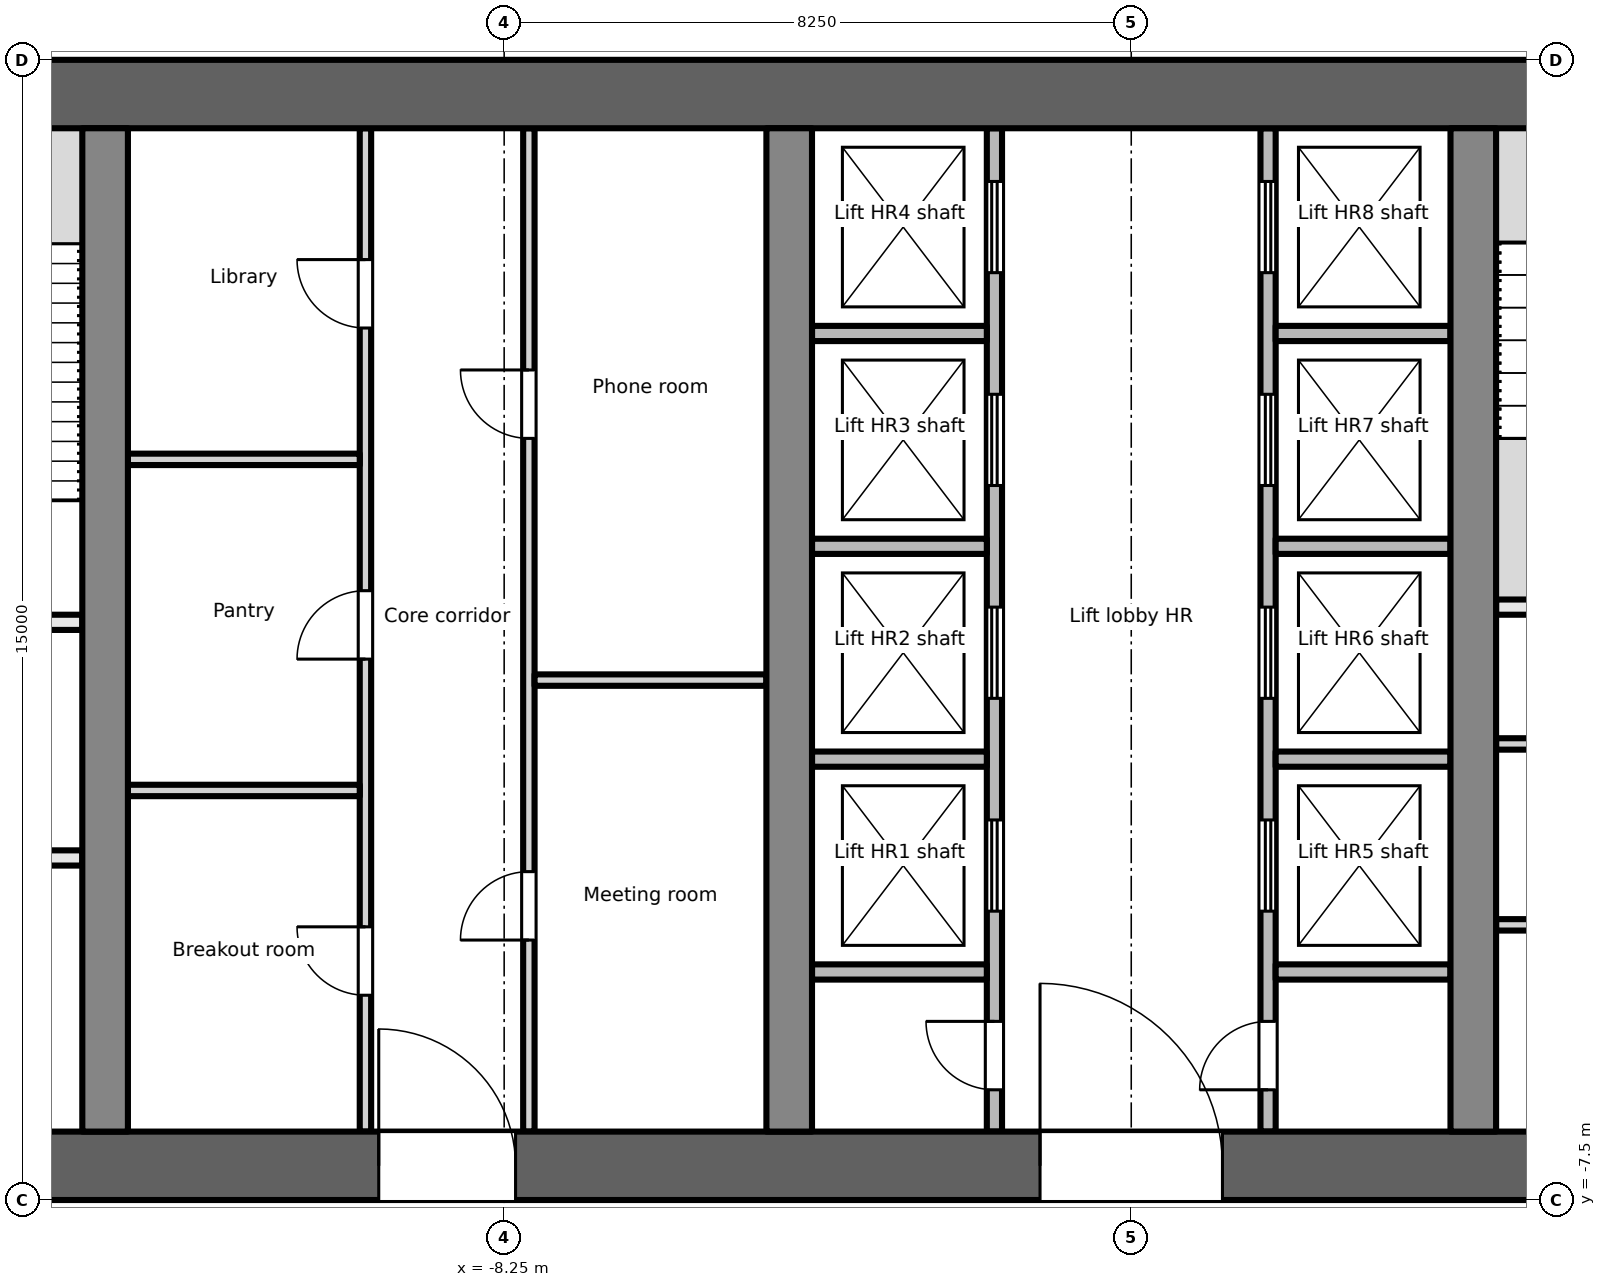
"""IFC4 building model, lengths in metres.
Left out: names, types, materials, properties, quantities, classifications, styles, units other than length and angle.
Written with IfcOpenShell. Run it as: python <this file> out.ifc"""

import sys

from ifc_helpers import new_model, si_unit, direction, frame, frame_2d, origin, place, context, subcontext, project, spatial, rectangle, extrude, element, fill, save


model = new_model("IFC4")
c1 = context("Model", 3, precision=1e-05, world=origin(), true_north=direction((0.0, 1.0)))
c2 = subcontext(c1, "Body", "Model", "MODEL_VIEW")
j1 = project(units=[si_unit("LENGTHUNIT", "METRE"), si_unit("PLANEANGLEUNIT", "RADIAN")], contexts=[c1])
p1 = place(None, origin())
s1 = spatial("IfcSite", under=j1, at=p1, CompositionType="ELEMENT")
p2 = place(p1, origin())
s2 = spatial("IfcBuilding", under=s1, at=p2, CompositionType="ELEMENT")
p3 = place(p2, frame((0.0, 0.0, 244.7)))
s3 = spatial("IfcBuildingStorey", under=s2, at=p3, CompositionType="ELEMENT", Elevation=244.7)
p4 = place(p3, frame((-18.0, -7.05, -0.2), z_axis=(0.0, 0.0, 1.0), x_axis=(1.0, 0.0, 0.0)))
e1 = element("IfcWall", 1, at=p4, inside=s3, PredefinedType="SHEAR", context=c2, shape_type="SweptSolid", body=[
    extrude(rectangle(XDim=36.0, YDim=0.9, at=frame_2d((18.0, 0.0))), origin(), (0.0, 0.0, 1.0), 5.0),
])
p5 = place(p4, frame((8.1, 0.0, 0.2)))
e2 = element("IfcOpeningElement", 2, at=p5, cuts=e1, PredefinedType="OPENING", context=c2, shape_type="SweptSolid", body=[
    extrude(rectangle(XDim=1.8, YDim=2.1, at=frame_2d((0.9, 1.05))), frame((0.0, 0.46, 0.0), z_axis=(0.0, -1.0, 0.0), x_axis=(1.0, 0.0, 0.0)), (0.0, 0.0, 1.0), 0.921),
])
p6 = place(p4, frame((16.8, 0.0, 0.2)))
e3 = element("IfcOpeningElement", 3, at=p6, cuts=e1, PredefinedType="OPENING", context=c2, shape_type="SweptSolid", body=[
    extrude(rectangle(XDim=2.4, YDim=2.1, at=frame_2d((1.2, 1.05))), frame((0.0, 0.46, 0.0), z_axis=(0.0, -1.0, 0.0), x_axis=(1.0, 0.0, 0.0)), (0.0, 0.0, 1.0), 0.921),
])
p7 = place(p4, frame((26.1, 0.0, 0.2)))
e4 = element("IfcOpeningElement", 4, at=p7, cuts=e1, PredefinedType="OPENING", context=c2, shape_type="SweptSolid", body=[
    extrude(rectangle(XDim=2.4, YDim=2.1, at=frame_2d((1.2, 1.05))), frame((0.0, 0.46, 0.0), z_axis=(0.0, -1.0, 0.0), x_axis=(1.0, 0.0, 0.0)), (0.0, 0.0, 1.0), 0.921),
])
p8 = place(p3, frame((-18.0, 7.05, -0.2), z_axis=(0.0, 0.0, 1.0), x_axis=(1.0, 0.0, 0.0)))
e5 = element("IfcWall", 5, at=p8, inside=s3, PredefinedType="SHEAR", context=c2, shape_type="SweptSolid", body=[
    extrude(rectangle(XDim=36.0, YDim=0.9, at=frame_2d((18.0, 0.0))), origin(), (0.0, 0.0, 1.0), 5.0),
])
for number, where, z_axis, x_axis in (
    (6, (-13.5, -6.6, -0.2), (0.0, 0.0, 1.0), (0.0, 1.0, 0.0)),
    (7, (-4.5, -6.6, -0.2), (0.0, 0.0, 1.0), (0.0, 1.0, 0.0)),
    (8, (4.5, -6.6, -0.2), (0.0, 0.0, 1.0), (0.0, 1.0, 0.0)),
):
    element("IfcWall", number, at=place(p3, frame(where, z_axis=z_axis, x_axis=x_axis)), inside=s3, PredefinedType="SHEAR", context=c2, shape_type="SweptSolid", body=[
        extrude(rectangle(XDim=13.2, YDim=0.6, at=frame_2d((6.6, 0.0))), origin(), (0.0, 0.0, 1.0), 5.0),
    ])
p9 = place(p3, frame((-17.1, -3.0, 0.0), z_axis=(0.0, 0.0, 1.0), x_axis=(1.0, 0.0, 0.0)))
e9 = element("IfcWall", 9, at=p9, inside=s3, PredefinedType="PARTITIONING", context=c2, shape_type="SweptSolid", body=[
    extrude(rectangle(XDim=3.3, YDim=0.2, at=frame_2d((1.65, 0.0))), origin(), (0.0, 0.0, 1.0), 4.8),
])
p10 = place(p9, frame((1.1, 0.0, 0.0)))
e10 = element("IfcOpeningElement", 10, at=p10, cuts=e9, PredefinedType="OPENING", context=c2, shape_type="SweptSolid", body=[
    extrude(rectangle(XDim=1.1, YDim=2.1, at=frame_2d((0.55, 1.05))), frame((0.0, 0.111, 0.0), z_axis=(0.0, -1.0, 0.0), x_axis=(1.0, 0.0, 0.0)), (0.0, 0.0, 1.0), 0.221),
])
p11 = place(p3, frame((-17.1, 0.1, 0.0), z_axis=(0.0, 0.0, 1.0), x_axis=(1.0, 0.0, 0.0)))
e11 = element("IfcWall", 11, at=p11, inside=s3, PredefinedType="PARTITIONING", context=c2, shape_type="SweptSolid", body=[
    extrude(rectangle(XDim=3.3, YDim=0.2, at=frame_2d((1.65, 0.0))), origin(), (0.0, 0.0, 1.0), 4.8),
])
p12 = place(p11, frame((1.1, 0.0, 0.0)))
e12 = element("IfcOpeningElement", 12, at=p12, cuts=e11, PredefinedType="OPENING", context=c2, shape_type="SweptSolid", body=[
    extrude(rectangle(XDim=1.1, YDim=2.1, at=frame_2d((0.55, 1.05))), frame((0.0, 0.111, 0.0), z_axis=(0.0, -1.0, 0.0), x_axis=(1.0, 0.0, 0.0)), (0.0, 0.0, 1.0), 0.221),
])
p13 = place(p3, frame((-10.075, -6.6, 0.0), z_axis=(0.0, 0.0, 1.0), x_axis=(0.0, 1.0, 0.0)))
e13 = element("IfcWall", 13, at=p13, inside=s3, PredefinedType="PARTITIONING", context=c2, shape_type="SweptSolid", body=[
    extrude(rectangle(XDim=13.2, YDim=0.15, at=frame_2d((6.6, 0.0))), origin(), (0.0, 0.0, 1.0), 4.8),
])
p14 = place(p13, frame((1.794, 0.0, 0.0)))
e14 = element("IfcOpeningElement", 14, at=p14, cuts=e13, PredefinedType="OPENING", context=c2, shape_type="SweptSolid", body=[
    extrude(rectangle(XDim=0.9, YDim=2.1, at=frame_2d((0.45, 1.05))), frame((0.0, 0.085, 0.0), z_axis=(0.0, -1.0, 0.0), x_axis=(1.0, 0.0, 0.0)), (0.0, 0.0, 1.0), 0.171),
])
p15 = place(p13, frame((6.216, 0.0, 0.0)))
e15 = element("IfcOpeningElement", 15, at=p15, cuts=e13, PredefinedType="OPENING", context=c2, shape_type="SweptSolid", body=[
    extrude(rectangle(XDim=0.9, YDim=2.1, at=frame_2d((0.45, 1.05))), frame((0.0, 0.085, 0.0), z_axis=(0.0, -1.0, 0.0), x_axis=(1.0, 0.0, 0.0)), (0.0, 0.0, 1.0), 0.171),
])
p16 = place(p13, frame((10.572, 0.0, 0.0)))
e16 = element("IfcOpeningElement", 16, at=p16, cuts=e13, PredefinedType="OPENING", context=c2, shape_type="SweptSolid", body=[
    extrude(rectangle(XDim=0.9, YDim=2.1, at=frame_2d((0.45, 1.05))), frame((0.0, 0.085, 0.0), z_axis=(0.0, -1.0, 0.0), x_axis=(1.0, 0.0, 0.0)), (0.0, 0.0, 1.0), 0.171),
])
for number, where, z_axis, x_axis in (
    (17, (-13.2, -2.112, 0.0), (0.0, 0.0, 1.0), (1.0, 0.0, 0.0)),
    (18, (-13.2, 2.244, 0.0), (0.0, 0.0, 1.0), (1.0, 0.0, 0.0)),
):
    element("IfcWall", number, at=place(p3, frame(where, z_axis=z_axis, x_axis=x_axis)), inside=s3, PredefinedType="PARTITIONING", context=c2, shape_type="SweptSolid", body=[
        extrude(rectangle(XDim=3.05, YDim=0.15, at=frame_2d((1.525, 0.0))), origin(), (0.0, 0.0, 1.0), 4.8),
    ])
p17 = place(p3, frame((-7.925, -6.6, 0.0), z_axis=(0.0, 0.0, 1.0), x_axis=(0.0, 1.0, 0.0)))
e19 = element("IfcWall", 19, at=p17, inside=s3, PredefinedType="PARTITIONING", context=c2, shape_type="SweptSolid", body=[
    extrude(rectangle(XDim=13.2, YDim=0.15, at=frame_2d((6.6, 0.0))), origin(), (0.0, 0.0, 1.0), 4.8),
])
p18 = place(p17, frame((2.52, 0.0, 0.0)))
e20 = element("IfcOpeningElement", 20, at=p18, cuts=e19, PredefinedType="OPENING", context=c2, shape_type="SweptSolid", body=[
    extrude(rectangle(XDim=0.9, YDim=2.1, at=frame_2d((0.45, 1.05))), frame((0.0, 0.085, 0.0), z_axis=(0.0, -1.0, 0.0), x_axis=(1.0, 0.0, 0.0)), (0.0, 0.0, 1.0), 0.171),
])
p19 = place(p17, frame((9.12, 0.0, 0.0)))
e21 = element("IfcOpeningElement", 21, at=p19, cuts=e19, PredefinedType="OPENING", context=c2, shape_type="SweptSolid", body=[
    extrude(rectangle(XDim=0.9, YDim=2.1, at=frame_2d((0.45, 1.05))), frame((0.0, 0.085, 0.0), z_axis=(0.0, -1.0, 0.0), x_axis=(1.0, 0.0, 0.0)), (0.0, 0.0, 1.0), 0.171),
])
p20 = place(p3, frame((-7.85, -0.66, 0.0), z_axis=(0.0, 0.0, 1.0), x_axis=(1.0, 0.0, 0.0)))
e22 = element("IfcWall", 22, at=p20, inside=s3, PredefinedType="PARTITIONING", context=c2, shape_type="SweptSolid", body=[
    extrude(rectangle(XDim=3.05, YDim=0.15, at=frame_2d((1.525, 0.0))), origin(), (0.0, 0.0, 1.0), 4.8),
])
p21 = place(p3, frame((-1.8, -6.6, 0.0), z_axis=(0.0, 0.0, 1.0), x_axis=(0.0, 1.0, 0.0)))
e23 = element("IfcWall", 23, at=p21, inside=s3, PredefinedType="PARTITIONING", context=c2, shape_type="SweptSolid", body=[
    extrude(rectangle(XDim=13.2, YDim=0.2, at=frame_2d((6.6, 0.0))), origin(), (0.0, 0.0, 1.0), 4.8),
])
p22 = place(p21, frame((0.55, 0.0, 0.0)))
e24 = element("IfcOpeningElement", 24, at=p22, cuts=e23, PredefinedType="OPENING", context=c2, shape_type="SweptSolid", body=[
    extrude(rectangle(XDim=0.9, YDim=2.1, at=frame_2d((0.45, 1.05))), frame((0.0, 0.111, 0.0), z_axis=(0.0, -1.0, 0.0), x_axis=(1.0, 0.0, 0.0)), (0.0, 0.0, 1.0), 0.221),
])
p23 = place(p21, frame((2.9, 0.0, 0.0)))
e25 = element("IfcOpeningElement", 25, at=p23, cuts=e23, PredefinedType="OPENING", context=c2, shape_type="SweptSolid", body=[
    extrude(rectangle(XDim=1.2, YDim=2.1, at=frame_2d((0.6, 1.05))), frame((0.0, 0.111, 0.0), z_axis=(0.0, -1.0, 0.0), x_axis=(1.0, 0.0, 0.0)), (0.0, 0.0, 1.0), 0.221),
])
p24 = place(p21, frame((5.7, 0.0, 0.0)))
e26 = element("IfcOpeningElement", 26, at=p24, cuts=e23, PredefinedType="OPENING", context=c2, shape_type="SweptSolid", body=[
    extrude(rectangle(XDim=1.2, YDim=2.1, at=frame_2d((0.6, 1.05))), frame((0.0, 0.111, 0.0), z_axis=(0.0, -1.0, 0.0), x_axis=(1.0, 0.0, 0.0)), (0.0, 0.0, 1.0), 0.221),
])
p25 = place(p21, frame((8.5, 0.0, 0.0)))
e27 = element("IfcOpeningElement", 27, at=p25, cuts=e23, PredefinedType="OPENING", context=c2, shape_type="SweptSolid", body=[
    extrude(rectangle(XDim=1.2, YDim=2.1, at=frame_2d((0.6, 1.05))), frame((0.0, 0.111, 0.0), z_axis=(0.0, -1.0, 0.0), x_axis=(1.0, 0.0, 0.0)), (0.0, 0.0, 1.0), 0.221),
])
p26 = place(p21, frame((11.3, 0.0, 0.0)))
e28 = element("IfcOpeningElement", 28, at=p26, cuts=e23, PredefinedType="OPENING", context=c2, shape_type="SweptSolid", body=[
    extrude(rectangle(XDim=1.2, YDim=2.1, at=frame_2d((0.6, 1.05))), frame((0.0, 0.111, 0.0), z_axis=(0.0, -1.0, 0.0), x_axis=(1.0, 0.0, 0.0)), (0.0, 0.0, 1.0), 0.221),
])
p27 = place(p3, frame((1.8, -6.6, 0.0), z_axis=(0.0, 0.0, 1.0), x_axis=(0.0, 1.0, 0.0)))
e29 = element("IfcWall", 29, at=p27, inside=s3, PredefinedType="PARTITIONING", context=c2, shape_type="SweptSolid", body=[
    extrude(rectangle(XDim=13.2, YDim=0.2, at=frame_2d((6.6, 0.0))), origin(), (0.0, 0.0, 1.0), 4.8),
])
p28 = place(p27, frame((0.55, 0.0, 0.0)))
e30 = element("IfcOpeningElement", 30, at=p28, cuts=e29, PredefinedType="OPENING", context=c2, shape_type="SweptSolid", body=[
    extrude(rectangle(XDim=0.9, YDim=2.1, at=frame_2d((0.45, 1.05))), frame((0.0, 0.111, 0.0), z_axis=(0.0, -1.0, 0.0), x_axis=(1.0, 0.0, 0.0)), (0.0, 0.0, 1.0), 0.221),
])
p29 = place(p27, frame((2.9, 0.0, 0.0)))
e31 = element("IfcOpeningElement", 31, at=p29, cuts=e29, PredefinedType="OPENING", context=c2, shape_type="SweptSolid", body=[
    extrude(rectangle(XDim=1.2, YDim=2.1, at=frame_2d((0.6, 1.05))), frame((0.0, 0.111, 0.0), z_axis=(0.0, -1.0, 0.0), x_axis=(1.0, 0.0, 0.0)), (0.0, 0.0, 1.0), 0.221),
])
p30 = place(p27, frame((5.7, 0.0, 0.0)))
e32 = element("IfcOpeningElement", 32, at=p30, cuts=e29, PredefinedType="OPENING", context=c2, shape_type="SweptSolid", body=[
    extrude(rectangle(XDim=1.2, YDim=2.1, at=frame_2d((0.6, 1.05))), frame((0.0, 0.111, 0.0), z_axis=(0.0, -1.0, 0.0), x_axis=(1.0, 0.0, 0.0)), (0.0, 0.0, 1.0), 0.221),
])
p31 = place(p27, frame((8.5, 0.0, 0.0)))
e33 = element("IfcOpeningElement", 33, at=p31, cuts=e29, PredefinedType="OPENING", context=c2, shape_type="SweptSolid", body=[
    extrude(rectangle(XDim=1.2, YDim=2.1, at=frame_2d((0.6, 1.05))), frame((0.0, 0.111, 0.0), z_axis=(0.0, -1.0, 0.0), x_axis=(1.0, 0.0, 0.0)), (0.0, 0.0, 1.0), 0.221),
])
p32 = place(p27, frame((11.3, 0.0, 0.0)))
e34 = element("IfcOpeningElement", 34, at=p32, cuts=e29, PredefinedType="OPENING", context=c2, shape_type="SweptSolid", body=[
    extrude(rectangle(XDim=1.2, YDim=2.1, at=frame_2d((0.6, 1.05))), frame((0.0, 0.111, 0.0), z_axis=(0.0, -1.0, 0.0), x_axis=(1.0, 0.0, 0.0)), (0.0, 0.0, 1.0), 0.221),
])
for number, where, z_axis, x_axis in (
    (35, (-4.2, -1.7, 0.0), (0.0, 0.0, 1.0), (1.0, 0.0, 0.0)),
    (36, (-4.2, 1.1, 0.0), (0.0, 0.0, 1.0), (1.0, 0.0, 0.0)),
    (37, (-4.2, 3.9, 0.0), (0.0, 0.0, 1.0), (1.0, 0.0, 0.0)),
    (38, (-4.2, -4.5, 0.0), (0.0, 0.0, 1.0), (1.0, 0.0, 0.0)),
    (39, (1.9, -1.7, 0.0), (0.0, 0.0, 1.0), (1.0, 0.0, 0.0)),
    (40, (1.9, 1.1, 0.0), (0.0, 0.0, 1.0), (1.0, 0.0, 0.0)),
    (41, (1.9, 3.9, 0.0), (0.0, 0.0, 1.0), (1.0, 0.0, 0.0)),
    (42, (1.9, -4.5, 0.0), (0.0, 0.0, 1.0), (1.0, 0.0, 0.0)),
):
    element("IfcWall", number, at=place(p3, frame(where, z_axis=z_axis, x_axis=x_axis)), inside=s3, PredefinedType="PARTITIONING", context=c2, shape_type="SweptSolid", body=[
        extrude(rectangle(XDim=2.3, YDim=0.2, at=frame_2d((1.15, 0.0))), origin(), (0.0, 0.0, 1.0), 4.8),
    ])
p33 = place(p3, frame((4.8, 0.3, 0.0), z_axis=(0.0, 0.0, 1.0), x_axis=(1.0, 0.0, 0.0)))
e43 = element("IfcWall", 43, at=p33, inside=s3, PredefinedType="PARTITIONING", context=c2, shape_type="SweptSolid", body=[
    extrude(rectangle(XDim=3.15, YDim=0.2, at=frame_2d((1.575, 0.0))), origin(), (0.0, 0.0, 1.0), 4.8),
])
for number, where, z_axis, x_axis in (
    (44, (4.8, -3.88, 0.0), (0.0, 0.0, 1.0), (1.0, 0.0, 0.0)),
    (45, (4.8, -1.5, 0.0), (0.0, 0.0, 1.0), (1.0, 0.0, 0.0)),
):
    element("IfcWall", number, at=place(p3, frame(where, z_axis=z_axis, x_axis=x_axis)), inside=s3, PredefinedType="PARTITIONING", context=c2, shape_type="SweptSolid", body=[
        extrude(rectangle(XDim=3.15, YDim=0.15, at=frame_2d((1.575, 0.0))), origin(), (0.0, 0.0, 1.0), 4.8),
    ])
p34 = place(p14, origin())
e46 = element("IfcDoor", 46, at=p34, inside=s3, OperationType="SINGLE_SWING_RIGHT", PredefinedType="DOOR", context=c2, shape_type="SweptSolid", body=[
    extrude(rectangle(XDim=0.9, YDim=2.1, at=frame_2d((0.45, 1.05))), frame((0.0, 0.025, 0.0), z_axis=(0.0, -1.0, 0.0), x_axis=(1.0, 0.0, 0.0)), (0.0, 0.0, 1.0), 0.05),
])
fill(e14, e46)
p35 = place(p15, origin())
e47 = element("IfcDoor", 47, at=p35, inside=s3, OperationType="SINGLE_SWING_LEFT", PredefinedType="DOOR", context=c2, shape_type="SweptSolid", body=[
    extrude(rectangle(XDim=0.9, YDim=2.1, at=frame_2d((0.45, 1.05))), frame((0.0, 0.025, 0.0), z_axis=(0.0, -1.0, 0.0), x_axis=(1.0, 0.0, 0.0)), (0.0, 0.0, 1.0), 0.05),
])
fill(e15, e47)
p36 = place(p16, origin())
e48 = element("IfcDoor", 48, at=p36, inside=s3, OperationType="SINGLE_SWING_RIGHT", PredefinedType="DOOR", context=c2, shape_type="SweptSolid", body=[
    extrude(rectangle(XDim=0.9, YDim=2.1, at=frame_2d((0.45, 1.05))), frame((0.0, 0.025, 0.0), z_axis=(0.0, -1.0, 0.0), x_axis=(1.0, 0.0, 0.0)), (0.0, 0.0, 1.0), 0.05),
])
fill(e16, e48)
p37 = place(p18, origin())
e49 = element("IfcDoor", 49, at=p37, inside=s3, OperationType="SINGLE_SWING_LEFT", PredefinedType="DOOR", context=c2, shape_type="SweptSolid", body=[
    extrude(rectangle(XDim=0.9, YDim=2.1, at=frame_2d((0.45, 1.05))), frame((0.0, 0.025, 0.0), z_axis=(0.0, -1.0, 0.0), x_axis=(1.0, 0.0, 0.0)), (0.0, 0.0, 1.0), 0.05),
])
fill(e20, e49)
p38 = place(p19, origin())
e50 = element("IfcDoor", 50, at=p38, inside=s3, OperationType="SINGLE_SWING_RIGHT", PredefinedType="DOOR", context=c2, shape_type="SweptSolid", body=[
    extrude(rectangle(XDim=0.9, YDim=2.1, at=frame_2d((0.45, 1.05))), frame((0.0, 0.025, 0.0), z_axis=(0.0, -1.0, 0.0), x_axis=(1.0, 0.0, 0.0)), (0.0, 0.0, 1.0), 0.05),
])
fill(e21, e50)
p39 = place(p5, origin())
e51 = element("IfcDoor", 51, at=p39, inside=s3, OperationType="SINGLE_SWING_LEFT", PredefinedType="DOOR", context=c2, shape_type="SweptSolid", body=[
    extrude(rectangle(XDim=1.8, YDim=2.1, at=frame_2d((0.9, 1.05))), frame((0.0, 0.025, 0.0), z_axis=(0.0, -1.0, 0.0), x_axis=(1.0, 0.0, 0.0)), (0.0, 0.0, 1.0), 0.05),
])
fill(e2, e51)
p40 = place(p22, origin())
e52 = element("IfcDoor", 52, at=p40, inside=s3, OperationType="SINGLE_SWING_RIGHT", PredefinedType="DOOR", context=c2, shape_type="SweptSolid", body=[
    extrude(rectangle(XDim=0.9, YDim=2.1, at=frame_2d((0.45, 1.05))), frame((0.0, 0.025, 0.0), z_axis=(0.0, -1.0, 0.0), x_axis=(1.0, 0.0, 0.0)), (0.0, 0.0, 1.0), 0.05),
])
fill(e24, e52)
p41 = place(p23, origin())
e53 = element("IfcDoor", 53, at=p41, inside=s3, OperationType="DOUBLE_DOOR_SLIDING", PredefinedType="DOOR", context=c2, shape_type="SweptSolid", body=[
    extrude(rectangle(XDim=1.2, YDim=2.1, at=frame_2d((0.6, 1.05))), frame((0.0, 0.025, 0.0), z_axis=(0.0, -1.0, 0.0), x_axis=(1.0, 0.0, 0.0)), (0.0, 0.0, 1.0), 0.05),
])
fill(e25, e53)
p42 = place(p24, origin())
e54 = element("IfcDoor", 54, at=p42, inside=s3, OperationType="DOUBLE_DOOR_SLIDING", PredefinedType="DOOR", context=c2, shape_type="SweptSolid", body=[
    extrude(rectangle(XDim=1.2, YDim=2.1, at=frame_2d((0.6, 1.05))), frame((0.0, 0.025, 0.0), z_axis=(0.0, -1.0, 0.0), x_axis=(1.0, 0.0, 0.0)), (0.0, 0.0, 1.0), 0.05),
])
fill(e26, e54)
p43 = place(p25, origin())
e55 = element("IfcDoor", 55, at=p43, inside=s3, OperationType="DOUBLE_DOOR_SLIDING", PredefinedType="DOOR", context=c2, shape_type="SweptSolid", body=[
    extrude(rectangle(XDim=1.2, YDim=2.1, at=frame_2d((0.6, 1.05))), frame((0.0, 0.025, 0.0), z_axis=(0.0, -1.0, 0.0), x_axis=(1.0, 0.0, 0.0)), (0.0, 0.0, 1.0), 0.05),
])
fill(e27, e55)
p44 = place(p26, origin())
e56 = element("IfcDoor", 56, at=p44, inside=s3, OperationType="DOUBLE_DOOR_SLIDING", PredefinedType="DOOR", context=c2, shape_type="SweptSolid", body=[
    extrude(rectangle(XDim=1.2, YDim=2.1, at=frame_2d((0.6, 1.05))), frame((0.0, 0.025, 0.0), z_axis=(0.0, -1.0, 0.0), x_axis=(1.0, 0.0, 0.0)), (0.0, 0.0, 1.0), 0.05),
])
fill(e28, e56)
p45 = place(p28, origin())
e57 = element("IfcDoor", 57, at=p45, inside=s3, OperationType="SINGLE_SWING_LEFT", PredefinedType="DOOR", context=c2, shape_type="SweptSolid", body=[
    extrude(rectangle(XDim=0.9, YDim=2.1, at=frame_2d((0.45, 1.05))), frame((0.0, 0.025, 0.0), z_axis=(0.0, -1.0, 0.0), x_axis=(1.0, 0.0, 0.0)), (0.0, 0.0, 1.0), 0.05),
])
fill(e30, e57)
p46 = place(p29, origin())
e58 = element("IfcDoor", 58, at=p46, inside=s3, OperationType="DOUBLE_DOOR_SLIDING", PredefinedType="DOOR", context=c2, shape_type="SweptSolid", body=[
    extrude(rectangle(XDim=1.2, YDim=2.1, at=frame_2d((0.6, 1.05))), frame((0.0, 0.025, 0.0), z_axis=(0.0, -1.0, 0.0), x_axis=(1.0, 0.0, 0.0)), (0.0, 0.0, 1.0), 0.05),
])
fill(e31, e58)
p47 = place(p30, origin())
e59 = element("IfcDoor", 59, at=p47, inside=s3, OperationType="DOUBLE_DOOR_SLIDING", PredefinedType="DOOR", context=c2, shape_type="SweptSolid", body=[
    extrude(rectangle(XDim=1.2, YDim=2.1, at=frame_2d((0.6, 1.05))), frame((0.0, 0.025, 0.0), z_axis=(0.0, -1.0, 0.0), x_axis=(1.0, 0.0, 0.0)), (0.0, 0.0, 1.0), 0.05),
])
fill(e32, e59)
p48 = place(p31, origin())
e60 = element("IfcDoor", 60, at=p48, inside=s3, OperationType="DOUBLE_DOOR_SLIDING", PredefinedType="DOOR", context=c2, shape_type="SweptSolid", body=[
    extrude(rectangle(XDim=1.2, YDim=2.1, at=frame_2d((0.6, 1.05))), frame((0.0, 0.025, 0.0), z_axis=(0.0, -1.0, 0.0), x_axis=(1.0, 0.0, 0.0)), (0.0, 0.0, 1.0), 0.05),
])
fill(e33, e60)
p49 = place(p32, origin())
e61 = element("IfcDoor", 61, at=p49, inside=s3, OperationType="DOUBLE_DOOR_SLIDING", PredefinedType="DOOR", context=c2, shape_type="SweptSolid", body=[
    extrude(rectangle(XDim=1.2, YDim=2.1, at=frame_2d((0.6, 1.05))), frame((0.0, 0.025, 0.0), z_axis=(0.0, -1.0, 0.0), x_axis=(1.0, 0.0, 0.0)), (0.0, 0.0, 1.0), 0.05),
])
fill(e34, e61)
p50 = place(p6, origin())
e62 = element("IfcDoor", 62, at=p50, inside=s3, OperationType="DOUBLE_DOOR_DOUBLE_SWING", PredefinedType="DOOR", context=c2, shape_type="SweptSolid", body=[
    extrude(rectangle(XDim=2.4, YDim=2.1, at=frame_2d((1.2, 1.05))), frame((0.0, 0.025, 0.0), z_axis=(0.0, -1.0, 0.0), x_axis=(1.0, 0.0, 0.0)), (0.0, 0.0, 1.0), 0.05),
])
fill(e3, e62)
save(model, sys.argv[1])
